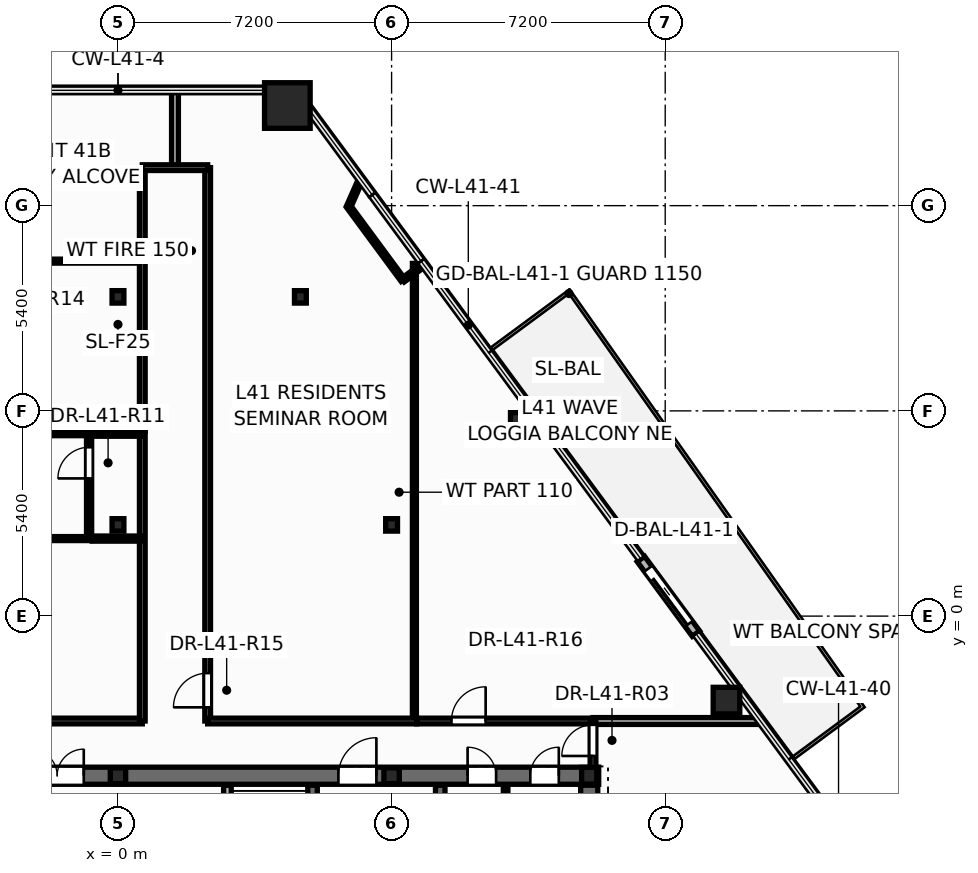
"""IFC4 building model, lengths in metres.
Left out: names, types, materials, properties, quantities, classifications, styles, units other than length and angle.
Written with IfcOpenShell. Run it as: python <this file> out.ifc"""

import sys

from ifc_helpers import new_model, si_unit, direction, frame, frame_2d, origin, origin_2d, place, context, subcontext, project, spatial, rectangle, hollow_rectangle, hollow_circle, i_section, extrude, element, fill, save


model = new_model("IFC4")
c1 = context("Model", 3, precision=1e-05, world=origin(), true_north=direction((0.0, 1.0)))
c2 = subcontext(c1, "Body", "Model", "MODEL_VIEW")
j1 = project(units=[si_unit("LENGTHUNIT", "METRE"), si_unit("PLANEANGLEUNIT", "RADIAN")], contexts=[c1])
p1 = place(None, origin())
s1 = spatial("IfcSite", under=j1, at=p1, CompositionType="ELEMENT")
p2 = place(p1, origin())
s2 = spatial("IfcBuilding", under=s1, at=p2, CompositionType="ELEMENT")
p3 = place(p2, frame((0.0, 0.0, 158.1)))
s3 = spatial("IfcBuildingStorey", under=s2, at=p3, CompositionType="ELEMENT", Elevation=158.1)
p4 = place(p3, frame((4.457, 13.435, 0.0), z_axis=(0.0, 0.0, 1.0), x_axis=(1.0, 0.0, 0.0)))
e1 = element("IfcColumn", 1, at=p4, inside=s3, PredefinedType="COLUMN", context=c2, shape_type="SweptSolid", body=[
    extrude(hollow_rectangle(XDim=1.2, YDim=1.2, WallThickness=0.055, at=origin_2d()), origin(), (0.0, 0.0, 1.0), 3.6),
])
for number, where, z_axis, x_axis in (
    (2, (16.012, -2.223, 0.0), (0.0, 0.0, 1.0), (1.0, 0.0, 0.0)),
    (3, (10.679, 5.003, 0.0), (0.0, 0.0, 1.0), (1.0, 0.0, 0.0)),
):
    element("IfcColumn", number, at=place(p3, frame(where, z_axis=z_axis, x_axis=x_axis)), inside=s3, PredefinedType="COLUMN", context=c2, shape_type="SweptSolid", body=[
        extrude(hollow_circle(Radius=0.35, WallThickness=0.03, at=origin_2d()), origin(), (0.0, 0.0, 1.0), 3.6),
    ])
p5 = place(p3, frame((12.4, -4.2, 0.0), z_axis=(0.0, 0.0, 1.0), x_axis=(1.0, 0.0, 0.0)))
e4 = element("IfcColumn", 4, at=p5, inside=s3, PredefinedType="COLUMN", context=c2, shape_type="SweptSolid", body=[
    extrude(i_section(OverallWidth=0.4, OverallDepth=0.44, WebThickness=0.028, FlangeThickness=0.04, at=origin_2d()), origin(), (0.0, 0.0, 1.0), 3.6),
])
for number, where, z_axis, x_axis in (
    (5, (0.0, -4.2, 0.0), (0.0, 0.0, 1.0), (1.0, 0.0, 0.0)),
    (6, (7.2, -4.2, 0.0), (0.0, 0.0, 1.0), (1.0, 0.0, 0.0)),
):
    element("IfcColumn", number, at=place(p3, frame(where, z_axis=z_axis, x_axis=x_axis)), inside=s3, PredefinedType="PILASTER", context=c2, shape_type="SweptSolid", body=[
        extrude(i_section(OverallWidth=0.405, OverallDepth=0.414, WebThickness=0.022, FlangeThickness=0.032, at=origin_2d()), origin(), (0.0, 0.0, 1.0), 3.6),
    ])
for number, where, z_axis, x_axis in (
    (7, (0.0, 2.4, 0.0), (0.0, 0.0, 1.0), (1.0, 0.0, 0.0)),
    (8, (7.2, 2.4, 0.0), (0.0, 0.0, 1.0), (1.0, 0.0, 0.0)),
    (9, (0.0, 8.4, 0.0), (0.0, 0.0, 1.0), (1.0, 0.0, 0.0)),
    (10, (4.8, 8.4, 0.0), (0.0, 0.0, 1.0), (1.0, 0.0, 0.0)),
):
    element("IfcColumn", number, at=place(p3, frame(where, z_axis=z_axis, x_axis=x_axis)), inside=s3, PredefinedType="COLUMN", context=c2, shape_type="SweptSolid", body=[
        extrude(i_section(OverallWidth=0.311, OverallDepth=0.327, WebThickness=0.016, FlangeThickness=0.025, at=origin_2d()), origin(), (0.0, 0.0, 1.0), 3.6),
    ])
p6 = place(p3, frame((15.208, -0.461, -0.015), z_axis=(0.0, 0.0, 1.0), x_axis=(-0.593785976482, 0.804623026102, 0.0)))
e11 = element("IfcWall", 11, at=p6, inside=s3, PredefinedType="STANDARD", context=c2, shape_type="SweptSolid", body=[
    extrude(rectangle(XDim=2.44, YDim=0.24, at=frame_2d((1.22, 0.0))), origin(), (0.0, 0.0, 1.0), 2.807),
])
p7 = place(p6, frame((0.32, 0.0, 0.015)))
e12 = element("IfcOpeningElement", 12, at=p7, cuts=e11, PredefinedType="OPENING", context=c2, shape_type="SweptSolid", body=[
    extrude(rectangle(XDim=1.806, YDim=2.204, at=frame_2d((0.9, 1.102))), frame((0.0, 0.13, 0.0), z_axis=(0.0, -1.0, 0.0), x_axis=(1.0, 0.0, 0.0)), (0.0, 0.0, 1.0), 0.26),
])
p8 = place(p3, frame((10.2, -5.52, 0.0), z_axis=(0.0, 0.0, 1.0), x_axis=(0.0, 1.0, 0.0)))
e13 = element("IfcWall", 13, at=p8, inside=s3, PredefinedType="PARTITIONING", context=c2, shape_type="SweptSolid", body=[
    extrude(rectangle(XDim=1.12, YDim=0.12, at=frame_2d((0.56, 0.0))), origin(), (0.0, 0.0, 1.0), 3.35),
])
p9 = place(p3, frame((-12.65, -4.2, 0.0), z_axis=(0.0, 0.0, 1.0), x_axis=(1.0, 0.0, 0.0)))
e14 = element("IfcWall", 14, at=p9, inside=s3, PredefinedType="SHEAR", context=c2, shape_type="SweptSolid", body=[
    extrude(rectangle(XDim=25.3, YDim=0.45, at=frame_2d((12.65, 0.0))), origin(), (0.0, 0.0, 1.0), 3.6),
])
p10 = place(p9, frame((0.95, 0.0, 0.0)))
e15 = element("IfcOpeningElement", 15, at=p10, cuts=e14, PredefinedType="OPENING", context=c2, shape_type="SweptSolid", body=[
    extrude(rectangle(XDim=0.756, YDim=2.054, at=frame_2d((0.375, 1.027))), frame((0.0, 0.235, 0.0), z_axis=(0.0, -1.0, 0.0), x_axis=(1.0, 0.0, 0.0)), (0.0, 0.0, 1.0), 0.47),
])
p11 = place(p9, frame((2.6, 0.0, 0.0)))
e16 = element("IfcOpeningElement", 16, at=p11, cuts=e14, PredefinedType="OPENING", context=c2, shape_type="SweptSolid", body=[
    extrude(rectangle(XDim=0.756, YDim=2.054, at=frame_2d((0.375, 1.027))), frame((0.0, 0.235, 0.0), z_axis=(0.0, -1.0, 0.0), x_axis=(1.0, 0.0, 0.0)), (0.0, 0.0, 1.0), 0.47),
])
p12 = place(p9, frame((21.85, 0.0, 0.0)))
e17 = element("IfcOpeningElement", 17, at=p12, cuts=e14, PredefinedType="OPENING", context=c2, shape_type="SweptSolid", body=[
    extrude(rectangle(XDim=0.756, YDim=2.054, at=frame_2d((0.375, 1.027))), frame((0.0, 0.235, 0.0), z_axis=(0.0, -1.0, 0.0), x_axis=(1.0, 0.0, 0.0)), (0.0, 0.0, 1.0), 0.47),
])
p13 = place(p9, frame((23.5, 0.0, 0.0)))
e18 = element("IfcOpeningElement", 18, at=p13, cuts=e14, PredefinedType="OPENING", context=c2, shape_type="SweptSolid", body=[
    extrude(rectangle(XDim=0.756, YDim=2.054, at=frame_2d((0.375, 1.027))), frame((0.0, 0.235, 0.0), z_axis=(0.0, -1.0, 0.0), x_axis=(1.0, 0.0, 0.0)), (0.0, 0.0, 1.0), 0.47),
])
p14 = place(p9, frame((5.85, 0.0, 0.0)))
e19 = element("IfcOpeningElement", 19, at=p14, cuts=e14, PredefinedType="OPENING", context=c2, shape_type="SweptSolid", body=[
    extrude(rectangle(XDim=1.006, YDim=2.104, at=frame_2d((0.5, 1.052))), frame((0.0, 0.235, 0.0), z_axis=(0.0, -1.0, 0.0), x_axis=(1.0, 0.0, 0.0)), (0.0, 0.0, 1.0), 0.47),
])
p15 = place(p9, frame((10.35, 0.0, 0.0)))
e20 = element("IfcOpeningElement", 20, at=p15, cuts=e14, PredefinedType="OPENING", context=c2, shape_type="SweptSolid", body=[
    extrude(rectangle(XDim=1.406, YDim=2.154, at=frame_2d((0.7, 1.077))), frame((0.0, 0.235, 0.0), z_axis=(0.0, -1.0, 0.0), x_axis=(1.0, 0.0, 0.0)), (0.0, 0.0, 1.0), 0.47),
])
p16 = place(p9, frame((18.45, 0.0, 0.0)))
e21 = element("IfcOpeningElement", 21, at=p16, cuts=e14, PredefinedType="OPENING", context=c2, shape_type="SweptSolid", body=[
    extrude(rectangle(XDim=1.006, YDim=2.104, at=frame_2d((0.5, 1.052))), frame((0.0, 0.235, 0.0), z_axis=(0.0, -1.0, 0.0), x_axis=(1.0, 0.0, 0.0)), (0.0, 0.0, 1.0), 0.47),
])
p17 = place(p3, frame((8.48, -13.85, 0.0), z_axis=(0.0, 0.0, 1.0), x_axis=(0.0, 1.0, 0.0)))
e22 = element("IfcWall", 22, at=p17, inside=s3, PredefinedType="SHEAR", context=c2, shape_type="SweptSolid", body=[
    extrude(rectangle(XDim=9.4, YDim=0.25, at=frame_2d((4.7, 0.0))), origin(), (0.0, 0.0, 1.0), 3.6),
])
p18 = place(p17, frame((6.95, 0.0, 0.0)))
e23 = element("IfcOpeningElement", 23, at=p18, cuts=e22, PredefinedType="OPENING", context=c2, shape_type="SweptSolid", body=[
    extrude(rectangle(XDim=1.006, YDim=2.104, at=frame_2d((0.5, 1.052))), frame((0.0, 0.135, 0.0), z_axis=(0.0, -1.0, 0.0), x_axis=(1.0, 0.0, 0.0)), (0.0, 0.0, 1.0), 0.27),
])
p19 = place(p3, frame((5.12, -13.85, 0.0), z_axis=(0.0, 0.0, 1.0), x_axis=(0.0, 1.0, 0.0)))
e24 = element("IfcWall", 24, at=p19, inside=s3, PredefinedType="SHEAR", context=c2, shape_type="SweptSolid", body=[
    extrude(rectangle(XDim=9.4, YDim=0.25, at=frame_2d((4.7, 0.0))), origin(), (0.0, 0.0, 1.0), 3.6),
])
p20 = place(p3, frame((12.4, -13.85, 0.0), z_axis=(0.0, 0.0, 1.0), x_axis=(0.0, 1.0, 0.0)))
e25 = element("IfcWall", 25, at=p20, inside=s3, PredefinedType="SHEAR", context=c2, shape_type="SweptSolid", body=[
    extrude(rectangle(XDim=9.4, YDim=0.45, at=frame_2d((4.7, 0.0))), origin(), (0.0, 0.0, 1.0), 3.6),
])
p21 = place(p3, frame((2.88, -9.45, 0.0), z_axis=(0.0, 0.0, 1.0), x_axis=(0.0, 1.0, 0.0)))
e26 = element("IfcWall", 26, at=p21, inside=s3, PredefinedType="SOLIDWALL", context=c2, shape_type="SweptSolid", body=[
    extrude(rectangle(XDim=5.0, YDim=0.2, at=frame_2d((2.5, 0.0))), origin(), (0.0, 0.0, 1.0), 3.35),
])
p22 = place(p21, frame((0.7, 0.0, 0.0)))
e27 = element("IfcOpeningElement", 27, at=p22, cuts=e26, PredefinedType="OPENING", context=c2, shape_type="SweptSolid", body=[
    extrude(rectangle(XDim=1.106, YDim=2.104, at=frame_2d((0.55, 1.052))), frame((0.0, 0.11, 0.0), z_axis=(0.0, -1.0, 0.0), x_axis=(1.0, 0.0, 0.0)), (0.0, 0.0, 1.0), 0.22),
])
p23 = place(p21, frame((3.15, 0.0, 0.0)))
e28 = element("IfcOpeningElement", 28, at=p23, cuts=e26, PredefinedType="OPENING", context=c2, shape_type="SweptSolid", body=[
    extrude(rectangle(XDim=1.106, YDim=2.104, at=frame_2d((0.55, 1.052))), frame((0.0, 0.11, 0.0), z_axis=(0.0, -1.0, 0.0), x_axis=(1.0, 0.0, 0.0)), (0.0, 0.0, 1.0), 0.22),
])
p24 = place(p3, frame((2.36, -2.76, 0.0), z_axis=(0.0, 0.0, 1.0), x_axis=(0.0, 1.0, 0.0)))
e29 = element("IfcWall", 29, at=p24, inside=s3, PredefinedType="PARTITIONING", context=c2, shape_type="SweptSolid", body=[
    extrude(rectangle(XDim=14.56, YDim=0.15, at=frame_2d((7.28, 0.0))), origin(), (0.0, 0.0, 1.0), 2.325),
])
p25 = place(p24, frame((0.36, 0.0, 0.0)))
e30 = element("IfcOpeningElement", 30, at=p25, cuts=e29, PredefinedType="OPENING", context=c2, shape_type="SweptSolid", body=[
    extrude(rectangle(XDim=0.906, YDim=2.104, at=frame_2d((0.45, 1.052))), frame((0.0, 0.085, 0.0), z_axis=(0.0, -1.0, 0.0), x_axis=(1.0, 0.0, 0.0)), (0.0, 0.0, 1.0), 0.17),
])
p26 = place(p3, frame((7.8, -2.76, 0.0), z_axis=(0.0, 0.0, 1.0), x_axis=(0.0, 1.0, 0.0)))
e31 = element("IfcWall", 31, at=p26, inside=s3, PredefinedType="PARTITIONING", context=c2, shape_type="SweptSolid", body=[
    extrude(rectangle(XDim=12.04, YDim=0.105, at=frame_2d((6.02, 0.0))), origin(), (0.0, 0.0, 1.0), 2.617),
])
p27 = place(p3, frame((2.36, -2.76, 0.0), z_axis=(0.0, 0.0, 1.0), x_axis=(1.0, 0.0, 0.0)))
e32 = element("IfcWall", 32, at=p27, inside=s3, PredefinedType="PARTITIONING", context=c2, shape_type="SweptSolid", body=[
    extrude(rectangle(XDim=5.5, YDim=0.15, at=frame_2d((2.75, 0.0))), origin(), (0.0, 0.0, 1.0), 2.325),
])
p28 = place(p3, frame((-4.338, -2.76, 0.0), z_axis=(0.0, 0.0, 1.0), x_axis=(1.0, 0.0, 0.0)))
e33 = element("IfcWall", 33, at=p28, inside=s3, PredefinedType="PARTITIONING", context=c2, shape_type="SweptSolid", body=[
    extrude(rectangle(XDim=4.978, YDim=0.15, at=frame_2d((2.489, 0.0))), origin(), (0.0, 0.0, 1.0), 2.325),
])
p29 = place(p28, frame((0.278, 0.0, 0.0)))
e34 = element("IfcOpeningElement", 34, at=p29, cuts=e33, PredefinedType="OPENING", context=c2, shape_type="SweptSolid", body=[
    extrude(rectangle(XDim=0.906, YDim=2.104, at=frame_2d((0.45, 1.052))), frame((0.0, 0.085, 0.0), z_axis=(0.0, -1.0, 0.0), x_axis=(1.0, 0.0, 0.0)), (0.0, 0.0, 1.0), 0.17),
])
p30 = place(p3, frame((-4.4, 9.34, 0.0), z_axis=(0.0, 0.0, 1.0), x_axis=(1.0, 0.0, 0.0)))
e35 = element("IfcWall", 35, at=p30, inside=s3, PredefinedType="PARTITIONING", context=c2, shape_type="SweptSolid", body=[
    extrude(rectangle(XDim=5.04, YDim=0.105, at=frame_2d((2.52, 0.0))), origin(), (0.0, 0.0, 1.0), 3.35),
])
p31 = place(p30, frame((1.387, 0.0, 0.0)))
e36 = element("IfcOpeningElement", 36, at=p31, cuts=e35, PredefinedType="OPENING", context=c2, shape_type="SweptSolid", body=[
    extrude(rectangle(XDim=0.886, YDim=2.104, at=frame_2d((0.44, 1.052))), frame((0.0, 0.062, 0.0), z_axis=(0.0, -1.0, 0.0), x_axis=(1.0, 0.0, 0.0)), (0.0, 0.0, 1.0), 0.125),
])
p32 = place(p3, frame((0.64, -2.76, 0.0), z_axis=(0.0, 0.0, 1.0), x_axis=(0.0, 1.0, 0.0)))
e37 = element("IfcWall", 37, at=p32, inside=s3, PredefinedType="PARTITIONING", context=c2, shape_type="SweptSolid", body=[
    extrude(rectangle(XDim=7.62, YDim=0.15, at=frame_2d((3.81, 0.0))), origin(), (0.0, 0.0, 1.0), 2.325),
])
p33 = place(p3, frame((7.862, -2.76, 0.0), z_axis=(0.0, 0.0, 1.0), x_axis=(1.0, 0.0, 0.0)))
e38 = element("IfcWall", 38, at=p33, inside=s3, PredefinedType="PARTITIONING", context=c2, shape_type="SweptSolid", body=[
    extrude(rectangle(XDim=4.638, YDim=0.15, at=frame_2d((2.319, 0.0))), origin(), (0.0, 0.0, 1.0), 3.35),
])
p34 = place(p33, frame((0.913, 0.0, 0.0)))
e39 = element("IfcOpeningElement", 39, at=p34, cuts=e38, PredefinedType="OPENING", context=c2, shape_type="SweptSolid", body=[
    extrude(rectangle(XDim=0.906, YDim=2.104, at=frame_2d((0.45, 1.052))), frame((0.0, 0.085, 0.0), z_axis=(0.0, -1.0, 0.0), x_axis=(1.0, 0.0, 0.0)), (0.0, 0.0, 1.0), 0.17),
])
p35 = place(p3, frame((0.64, 4.862, 0.0), z_axis=(0.0, 0.0, 1.0), x_axis=(0.0, 1.0, 0.0)))
e40 = element("IfcWall", 40, at=p35, inside=s3, PredefinedType="PARTITIONING", context=c2, shape_type="SweptSolid", body=[
    extrude(rectangle(XDim=6.938, YDim=0.15, at=frame_2d((3.469, 0.0))), origin(), (0.0, 0.0, 1.0), 2.617),
])
p36 = place(p3, frame((12.5, -2.76, 0.0), z_axis=(0.0, 0.0, 1.0), x_axis=(1.0, 0.0, 0.0)))
e41 = element("IfcWall", 41, at=p36, inside=s3, PredefinedType="PARTITIONING", context=c2, shape_type="SweptSolid", body=[
    extrude(rectangle(XDim=4.405, YDim=0.18, at=frame_2d((2.203, 0.0))), origin(), (0.0, 0.0, 1.0), 2.792),
])
p37 = place(p3, frame((-4.4, 2.04, 0.0), z_axis=(0.0, 0.0, 1.0), x_axis=(1.0, 0.0, 0.0)))
e42 = element("IfcWall", 42, at=p37, inside=s3, PredefinedType="PARTITIONING", context=c2, shape_type="SweptSolid", body=[
    extrude(rectangle(XDim=3.72, YDim=0.105, at=frame_2d((1.86, 0.0))), origin(), (0.0, 0.0, 1.0), 2.918),
])
p38 = place(p37, frame((0.356, 0.0, 0.0)))
e43 = element("IfcOpeningElement", 43, at=p38, cuts=e42, PredefinedType="OPENING", context=c2, shape_type="SweptSolid", body=[
    extrude(rectangle(XDim=0.886, YDim=2.104, at=frame_2d((0.44, 1.052))), frame((0.0, 0.062, 0.0), z_axis=(0.0, -1.0, 0.0), x_axis=(1.0, 0.0, 0.0)), (0.0, 0.0, 1.0), 0.125),
])
p39 = place(p3, frame((-4.4, 4.8, 0.0), z_axis=(0.0, 0.0, 1.0), x_axis=(1.0, 0.0, 0.0)))
e44 = element("IfcWall", 44, at=p39, inside=s3, PredefinedType="PARTITIONING", context=c2, shape_type="SweptSolid", body=[
    extrude(rectangle(XDim=3.64, YDim=0.105, at=frame_2d((1.82, 0.0))), origin(), (0.0, 0.0, 1.0), 2.918),
])
p40 = place(p39, frame((0.356, 0.0, 0.0)))
e45 = element("IfcOpeningElement", 45, at=p40, cuts=e44, PredefinedType="OPENING", context=c2, shape_type="SweptSolid", body=[
    extrude(rectangle(XDim=0.886, YDim=2.104, at=frame_2d((0.44, 1.052))), frame((0.0, 0.062, 0.0), z_axis=(0.0, -1.0, 0.0), x_axis=(1.0, 0.0, 0.0)), (0.0, 0.0, 1.0), 0.125),
])
p41 = place(p3, frame((-0.76, 2.04, 0.0), z_axis=(0.0, 0.0, 1.0), x_axis=(0.0, 1.0, 0.0)))
e46 = element("IfcWall", 46, at=p41, inside=s3, PredefinedType="PARTITIONING", context=c2, shape_type="SweptSolid", body=[
    extrude(rectangle(XDim=2.76, YDim=0.135, at=frame_2d((1.38, 0.0))), origin(), (0.0, 0.0, 1.0), 2.325),
])
p42 = place(p41, frame((1.583, 0.0, 0.0)))
e47 = element("IfcOpeningElement", 47, at=p42, cuts=e46, PredefinedType="OPENING", context=c2, shape_type="SweptSolid", body=[
    extrude(rectangle(XDim=0.826, YDim=2.104, at=frame_2d((0.41, 1.052))), frame((0.0, 0.078, 0.0), z_axis=(0.0, -1.0, 0.0), x_axis=(1.0, 0.0, 0.0)), (0.0, 0.0, 1.0), 0.155),
])
p43 = place(p3, frame((7.499, 8.841, 0.0), z_axis=(0.0, 0.0, 1.0), x_axis=(-0.593742732842, 0.804654936726, 0.0)))
e48 = element("IfcWall", 48, at=p43, inside=s3, PredefinedType="PARTITIONING", context=c2, shape_type="SweptSolid", body=[
    extrude(rectangle(XDim=2.404, YDim=0.12, at=frame_2d((1.202, 0.0))), origin(), (0.0, 0.0, 1.0), 3.35),
])
p44 = place(p3, frame((1.5, 11.8, 0.0), z_axis=(0.0, 0.0, 1.0), x_axis=(0.0, 1.0, 0.0)))
e49 = element("IfcWall", 49, at=p44, inside=s3, PredefinedType="PARTITIONING", context=c2, shape_type="SweptSolid", body=[
    extrude(rectangle(XDim=2.035, YDim=0.18, at=frame_2d((1.017, 0.0))), origin(), (0.0, 0.0, 1.0), 2.792),
])
p45 = place(p3, frame((12.5, -4.24, 0.0), z_axis=(0.0, 0.0, 1.0), x_axis=(0.0, 1.0, 0.0)))
e50 = element("IfcWall", 50, at=p45, inside=s3, PredefinedType="PARTITIONING", context=c2, shape_type="SweptSolid", body=[
    extrude(rectangle(XDim=1.48, YDim=0.15, at=frame_2d((0.74, 0.0))), origin(), (0.0, 0.0, 1.0), 2.325),
])
p46 = place(p45, frame((0.56, 0.0, 0.0)))
e51 = element("IfcOpeningElement", 51, at=p46, cuts=e50, PredefinedType="OPENING", context=c2, shape_type="SweptSolid", body=[
    extrude(rectangle(XDim=0.826, YDim=2.104, at=frame_2d((0.41, 1.052))), frame((0.0, 0.085, 0.0), z_axis=(0.0, -1.0, 0.0), x_axis=(1.0, 0.0, 0.0)), (0.0, 0.0, 1.0), 0.17),
])
p47 = place(p3, frame((-0.678, 2.04, 0.0), z_axis=(0.0, 0.0, 1.0), x_axis=(1.0, 0.0, 0.0)))
e52 = element("IfcWall", 52, at=p47, inside=s3, PredefinedType="PARTITIONING", context=c2, shape_type="SweptSolid", body=[
    extrude(rectangle(XDim=1.318, YDim=0.135, at=frame_2d((0.659, 0.0))), origin(), (0.0, 0.0, 1.0), 2.325),
])
p48 = place(p3, frame((-0.76, 4.8, 0.0), z_axis=(0.0, 0.0, 1.0), x_axis=(1.0, 0.0, 0.0)))
e53 = element("IfcWall", 53, at=p48, inside=s3, PredefinedType="PARTITIONING", context=c2, shape_type="SweptSolid", body=[
    extrude(rectangle(XDim=1.4, YDim=0.135, at=frame_2d((0.7, 0.0))), origin(), (0.0, 0.0, 1.0), 2.325),
])
p49 = place(p3, frame((0.64, 11.8, 0.0), z_axis=(0.0, 0.0, 1.0), x_axis=(1.0, 0.0, 0.0)))
e54 = element("IfcWall", 54, at=p49, inside=s3, PredefinedType="PARTITIONING", context=c2, shape_type="SweptSolid", body=[
    extrude(rectangle(XDim=1.72, YDim=0.15, at=frame_2d((0.86, 0.0))), origin(), (0.0, 0.0, 1.0), 3.35),
])
p50 = place(p3, frame((6.071, 10.776, 0.0), z_axis=(0.0, 0.0, 1.0), x_axis=(0.404053030965, 0.91473556188, 0.0)))
e55 = element("IfcWall", 55, at=p50, inside=s3, PredefinedType="PARTITIONING", context=c2, shape_type="SweptSolid", body=[
    extrude(rectangle(XDim=0.771, YDim=0.12, at=frame_2d((0.386, 0.0))), origin(), (0.0, 0.0, 1.0), 2.792),
])
p51 = place(p3, frame((8.038, 9.239, 0.0), z_axis=(0.0, 0.0, 1.0), x_axis=(-0.804652806385, -0.593745619922, 0.0)))
e56 = element("IfcWall", 56, at=p51, inside=s3, PredefinedType="PARTITIONING", context=c2, shape_type="SweptSolid", body=[
    extrude(rectangle(XDim=0.67, YDim=0.12, at=frame_2d((0.335, 0.0))), origin(), (0.0, 0.0, 1.0), 2.792),
])
p52 = place(p7, origin())
e57 = element("IfcDoor", 57, at=p52, inside=s3, OperationType="SLIDING_TO_LEFT", PredefinedType="DOOR", context=c2, shape_type="SweptSolid", body=[
    extrude(rectangle(XDim=1.8, YDim=2.2, at=frame_2d((0.9, 1.1))), frame((0.0, 0.025, 0.0), z_axis=(0.0, -1.0, 0.0), x_axis=(1.0, 0.0, 0.0)), (0.0, 0.0, 1.0), 0.05),
])
fill(e12, e57)
p53 = place(p12, origin())
e58 = element("IfcDoor", 58, at=p53, inside=s3, OperationType="SINGLE_SWING_LEFT", PredefinedType="DOOR", context=c2, shape_type="SweptSolid", body=[
    extrude(rectangle(XDim=0.75, YDim=2.05, at=frame_2d((0.375, 1.025))), frame((0.0, 0.025, 0.0), z_axis=(0.0, -1.0, 0.0), x_axis=(1.0, 0.0, 0.0)), (0.0, 0.0, 1.0), 0.05),
])
fill(e17, e58)
p54 = place(p13, origin())
e59 = element("IfcDoor", 59, at=p54, inside=s3, OperationType="SINGLE_SWING_RIGHT", PredefinedType="DOOR", context=c2, shape_type="SweptSolid", body=[
    extrude(rectangle(XDim=0.75, YDim=2.05, at=frame_2d((0.375, 1.025))), frame((0.0, 0.025, 0.0), z_axis=(0.0, -1.0, 0.0), x_axis=(1.0, 0.0, 0.0)), (0.0, 0.0, 1.0), 0.05),
])
fill(e18, e59)
p55 = place(p15, origin())
e60 = element("IfcDoor", 60, at=p55, inside=s3, OperationType="DOUBLE_DOOR_SINGLE_SWING", PredefinedType="DOOR", context=c2, shape_type="SweptSolid", body=[
    extrude(rectangle(XDim=1.4, YDim=2.15, at=frame_2d((0.7, 1.075))), frame((0.0, 0.025, 0.0), z_axis=(0.0, -1.0, 0.0), x_axis=(1.0, 0.0, 0.0)), (0.0, 0.0, 1.0), 0.05),
])
fill(e20, e60)
p56 = place(p16, origin())
e61 = element("IfcDoor", 61, at=p56, inside=s3, OperationType="SINGLE_SWING_RIGHT", PredefinedType="DOOR", context=c2, shape_type="SweptSolid", body=[
    extrude(rectangle(XDim=1.0, YDim=2.1, at=frame_2d((0.5, 1.05))), frame((0.0, 0.025, 0.0), z_axis=(0.0, -1.0, 0.0), x_axis=(1.0, 0.0, 0.0)), (0.0, 0.0, 1.0), 0.05),
])
fill(e21, e61)
p57 = place(p46, origin())
e62 = element("IfcDoor", 62, at=p57, inside=s3, OperationType="SINGLE_SWING_LEFT", PredefinedType="DOOR", context=c2, shape_type="SweptSolid", body=[
    extrude(rectangle(XDim=0.82, YDim=2.1, at=frame_2d((0.41, 1.05))), frame((0.0, 0.025, 0.0), z_axis=(0.0, -1.0, 0.0), x_axis=(1.0, 0.0, 0.0)), (0.0, 0.0, 1.0), 0.05),
])
fill(e51, e62)
p58 = place(p42, origin())
e63 = element("IfcDoor", 63, at=p58, inside=s3, OperationType="SINGLE_SWING_LEFT", PredefinedType="DOOR", context=c2, shape_type="SweptSolid", body=[
    extrude(rectangle(XDim=0.82, YDim=2.1, at=frame_2d((0.41, 1.05))), frame((0.0, 0.025, 0.0), z_axis=(0.0, -1.0, 0.0), x_axis=(1.0, 0.0, 0.0)), (0.0, 0.0, 1.0), 0.05),
])
fill(e47, e63)
p59 = place(p25, origin())
e64 = element("IfcDoor", 64, at=p59, inside=s3, OperationType="SINGLE_SWING_LEFT", PredefinedType="DOOR", context=c2, shape_type="SweptSolid", body=[
    extrude(rectangle(XDim=0.9, YDim=2.1, at=frame_2d((0.45, 1.05))), frame((0.0, 0.025, 0.0), z_axis=(0.0, -1.0, 0.0), x_axis=(1.0, 0.0, 0.0)), (0.0, 0.0, 1.0), 0.05),
])
fill(e30, e64)
p60 = place(p34, origin())
e65 = element("IfcDoor", 65, at=p60, inside=s3, OperationType="SINGLE_SWING_RIGHT", PredefinedType="DOOR", context=c2, shape_type="SweptSolid", body=[
    extrude(rectangle(XDim=0.9, YDim=2.1, at=frame_2d((0.45, 1.05))), frame((0.0, 0.025, 0.0), z_axis=(0.0, -1.0, 0.0), x_axis=(1.0, 0.0, 0.0)), (0.0, 0.0, 1.0), 0.05),
])
fill(e39, e65)
save(model, sys.argv[1])
